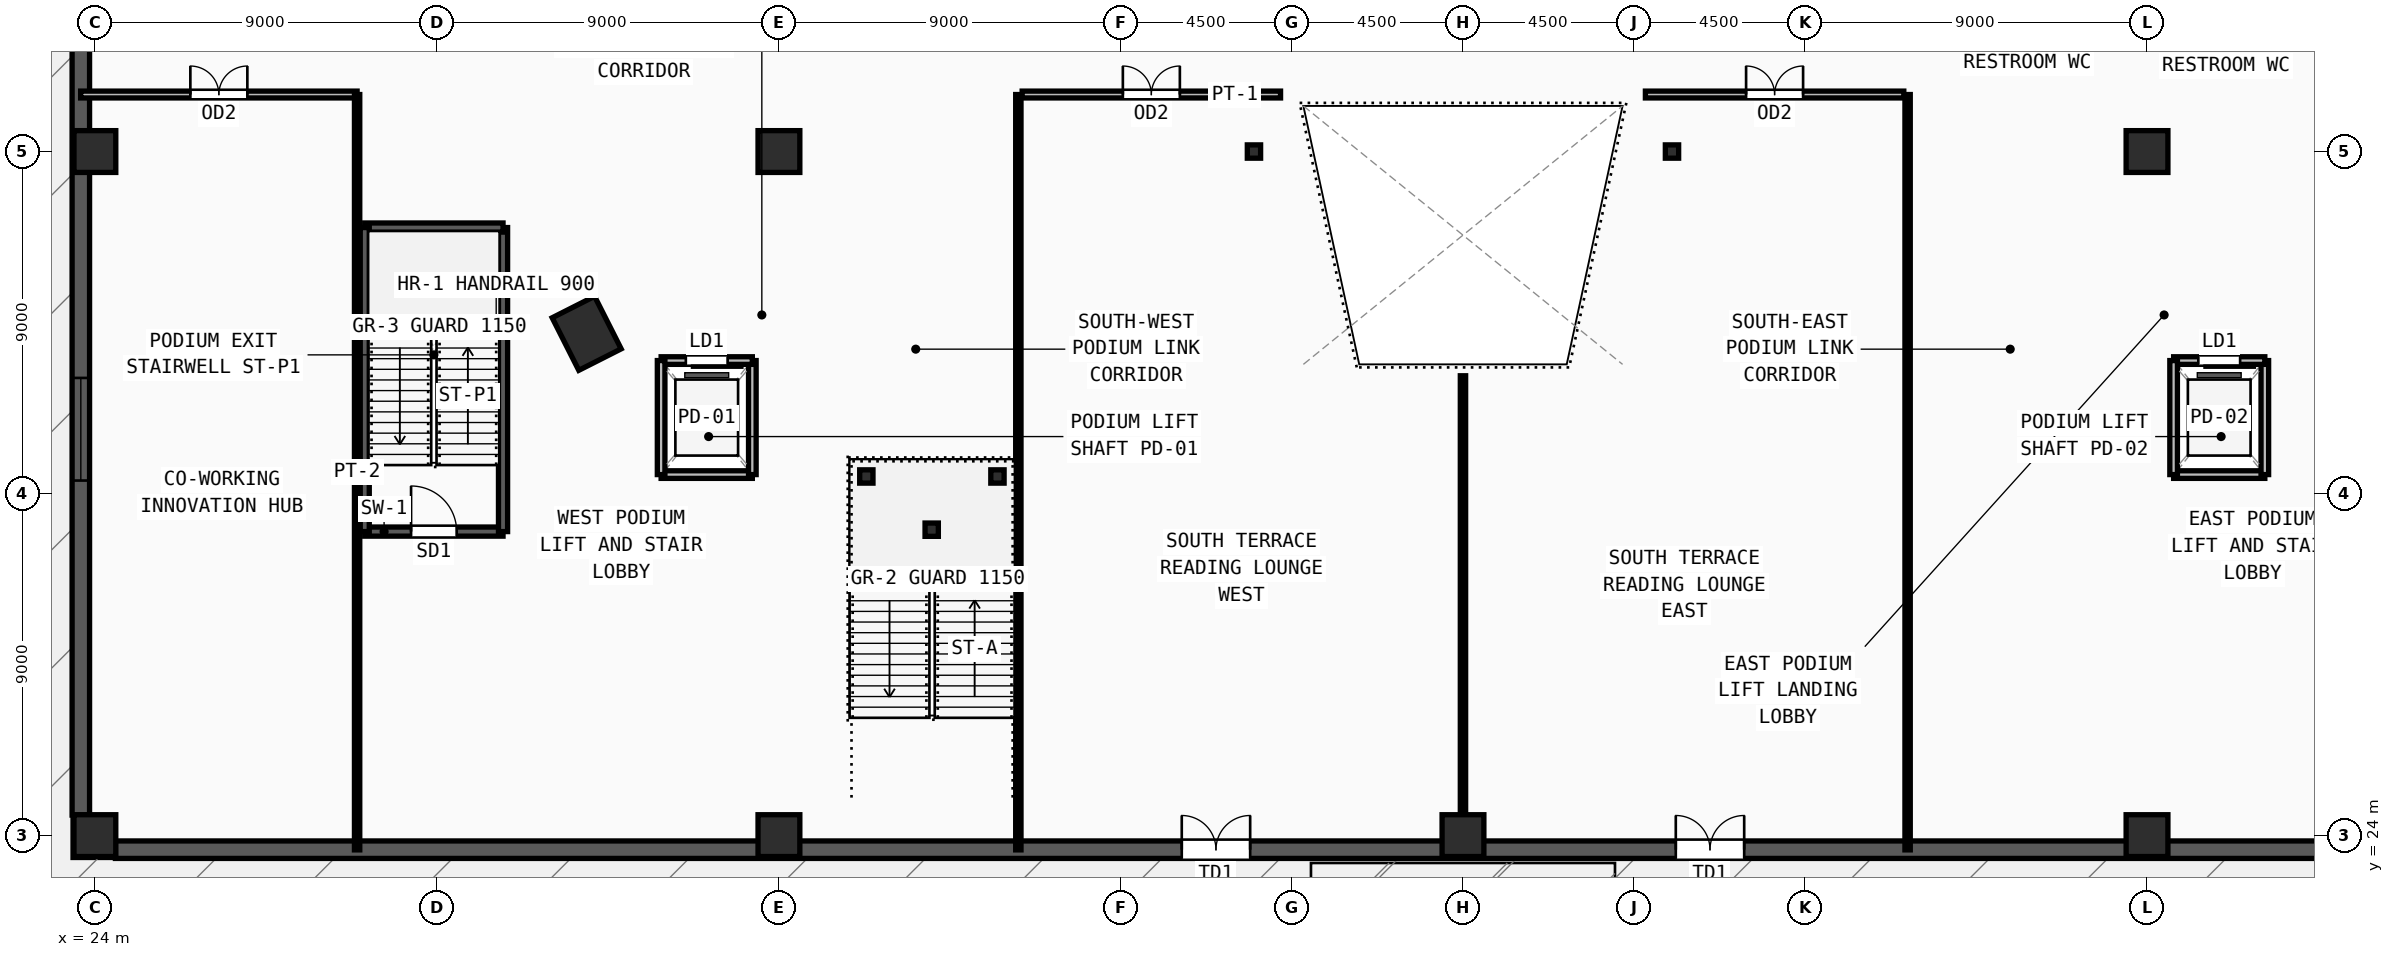
"""IFC4 building model, lengths in metres.
Left out: names, types, materials, properties, quantities, classifications, styles, units other than length and angle.
Written with IfcOpenShell. Run it as: python <this file> out.ifc"""

import sys

from ifc_helpers import new_model, si_unit, direction, frame, frame_2d, origin, origin_2d, place, context, subcontext, project, spatial, rectangle, i_section, extrude, source, transform, mapped, element, fill, save


model = new_model("IFC4")
c1 = context("Model", 3, precision=1e-05, world=origin(), true_north=direction((0.0, 1.0)))
c2 = subcontext(c1, "Body", "Model", "MODEL_VIEW")
j1 = project(units=[si_unit("LENGTHUNIT", "METRE"), si_unit("PLANEANGLEUNIT", "RADIAN")], contexts=[c1])
p1 = place(None, origin())
s1 = spatial("IfcSite", under=j1, at=p1, CompositionType="ELEMENT")
p2 = place(p1, origin())
s2 = spatial("IfcBuilding", under=s1, at=p2, CompositionType="ELEMENT")
p3 = place(p2, frame((0.0, 0.0, 18.9)))
s3 = spatial("IfcBuildingStorey", under=s2, at=p3, CompositionType="ELEMENT", Elevation=18.9)
m1 = source(origin(), c2, "Body", "SweptSolid", [
    extrude(rectangle(XDim=1.55, YDim=1.25, at=origin_2d()), origin(), (0.0, 0.0, 1.0), 4.5),
])
p4 = place(p3, frame((36.941, 37.217, 0.0), z_axis=(0.0, 0.0, 1.0), x_axis=(-0.451500573218, 0.892270829056, 0.0)))
e1 = element("IfcColumn", 1, at=p4, inside=s3, PredefinedType="COLUMN", context=c2, shape_type="MappedRepresentation", body=[
    mapped(m1, transform((0.0, 0.0, 0.0), x_axis=(1.0, 0.0, 0.0), y_axis=(0.0, 1.0, 0.0), z_axis=(0.0, 0.0, 1.0), scale=1.0)),
])
m2 = source(origin(), c2, "Body", "SweptSolid", [
    extrude(rectangle(XDim=1.1, YDim=1.1, at=origin_2d()), origin(), (0.0, 0.0, 1.0), 4.5),
])
for number, where, z_axis, x_axis in (
    (2, (24.0, 24.0, 0.0), (0.0, 0.0, 1.0), (1.0, 0.0, 0.0)),
    (3, (42.0, 24.0, 0.0), (0.0, 0.0, 1.0), (1.0, 0.0, 0.0)),
    (4, (60.0, 24.0, 0.0), (0.0, 0.0, 1.0), (1.0, 0.0, 0.0)),
    (5, (78.0, 24.0, 0.0), (0.0, 0.0, 1.0), (1.0, 0.0, 0.0)),
    (6, (24.0, 42.0, 0.0), (0.0, 0.0, 1.0), (1.0, 0.0, 0.0)),
    (7, (42.0, 42.0, 0.0), (0.0, 0.0, 1.0), (1.0, 0.0, 0.0)),
    (8, (78.0, 42.0, 0.0), (0.0, 0.0, 1.0), (1.0, 0.0, 0.0)),
):
    element("IfcColumn", number, at=place(p3, frame(where, z_axis=z_axis, x_axis=x_axis)), inside=s3, PredefinedType="COLUMN", context=c2, shape_type="MappedRepresentation", body=[
        mapped(m2, transform((0.0, 0.0, 0.0), x_axis=(1.0, 0.0, 0.0), y_axis=(0.0, 1.0, 0.0), z_axis=(0.0, 0.0, 1.0), scale=1.0)),
    ])
m3 = source(origin(), c2, "Body", "SweptSolid", [
    extrude(i_section(OverallWidth=0.35, OverallDepth=0.35, WebThickness=0.012, FlangeThickness=0.019, at=origin_2d()), origin(), (0.0, 0.0, 1.0), 4.5),
])
for number, where, z_axis, x_axis in (
    (9, (54.5, 42.0, 0.0), (0.0, 0.0, 1.0), (1.0, 0.0, 0.0)),
    (10, (65.5, 42.0, 0.0), (0.0, 0.0, 1.0), (1.0, 0.0, 0.0)),
    (11, (44.3, 33.45, 0.0), (0.0, 0.0, 1.0), (1.0, 0.0, 0.0)),
    (12, (47.75, 33.45, 0.0), (0.0, 0.0, 1.0), (1.0, 0.0, 0.0)),
    (13, (46.02, 32.05, 0.0), (0.0, 0.0, 1.0), (1.0, 0.0, 0.0)),
):
    element("IfcColumn", number, at=place(p3, frame(where, z_axis=z_axis, x_axis=x_axis)), inside=s3, PredefinedType="COLUMN", context=c2, shape_type="MappedRepresentation", body=[
        mapped(m3, transform((0.0, 0.0, 0.0), x_axis=(1.0, 0.0, 0.0), y_axis=(0.0, 1.0, 0.0), z_axis=(0.0, 0.0, 1.0), scale=1.0)),
    ])
p5 = place(p3, frame((23.63, 85.46, 0.0), z_axis=(0.0, 0.0, 1.0), x_axis=(0.0, -1.0, 0.0)))
e14 = element("IfcWall", 14, at=p5, inside=s3, PredefinedType="SOLIDWALL", context=c2, shape_type="SweptSolid", body=[
    extrude(rectangle(XDim=60.92, YDim=0.46, at=frame_2d((30.46, 0.0))), origin(), (0.0, 0.0, 1.0), 3.6),
])
m4 = source(origin(), c2, "Body", "SweptSolid", [
    extrude(rectangle(XDim=2.7, YDim=2.35, at=frame_2d((1.35, 1.175))), frame((0.0, 0.24, 0.0), z_axis=(0.0, -1.0, 0.0), x_axis=(1.0, 0.0, 0.0)), (0.0, 0.0, 1.0), 0.48),
])
p6 = place(p5, frame((8.803, 0.0, 0.55)))
e15 = element("IfcOpeningElement", 15, at=p6, cuts=e14, PredefinedType="OPENING", context=c2, shape_type="MappedRepresentation", body=[
    mapped(m4, transform((0.0, 0.0, 0.0), x_axis=(1.0, 0.0, 0.0), y_axis=(0.0, 1.0, 0.0), z_axis=(0.0, 0.0, 1.0), scale=1.0)),
])
p7 = place(p5, frame((18.957, 0.0, 0.55)))
e16 = element("IfcOpeningElement", 16, at=p7, cuts=e14, PredefinedType="OPENING", context=c2, shape_type="MappedRepresentation", body=[
    mapped(m4, transform((0.0, 0.0, 0.0), x_axis=(1.0, 0.0, 0.0), y_axis=(0.0, 1.0, 0.0), z_axis=(0.0, 0.0, 1.0), scale=1.0)),
])
p8 = place(p5, frame((29.11, 0.0, 0.55)))
e17 = element("IfcOpeningElement", 17, at=p8, cuts=e14, PredefinedType="OPENING", context=c2, shape_type="MappedRepresentation", body=[
    mapped(m4, transform((0.0, 0.0, 0.0), x_axis=(1.0, 0.0, 0.0), y_axis=(0.0, 1.0, 0.0), z_axis=(0.0, 0.0, 1.0), scale=1.0)),
])
p9 = place(p5, frame((49.417, 0.0, 0.55)))
e18 = element("IfcOpeningElement", 18, at=p9, cuts=e14, PredefinedType="OPENING", context=c2, shape_type="MappedRepresentation", body=[
    mapped(m4, transform((0.0, 0.0, 0.0), x_axis=(1.0, 0.0, 0.0), y_axis=(0.0, 1.0, 0.0), z_axis=(0.0, 0.0, 1.0), scale=1.0)),
])
p10 = place(p3, frame((24.54, 23.63, 0.0), z_axis=(0.0, 0.0, 1.0), x_axis=(1.0, 0.0, 0.0)))
e19 = element("IfcWall", 19, at=p10, inside=s3, PredefinedType="SOLIDWALL", context=c2, shape_type="SweptSolid", body=[
    extrude(rectangle(XDim=70.92, YDim=0.46, at=frame_2d((35.46, 0.0))), origin(), (0.0, 0.0, 1.0), 3.6),
])
m5 = source(origin(), c2, "Body", "SweptSolid", [
    extrude(rectangle(XDim=1.8, YDim=2.3, at=frame_2d((0.9, 1.15))), frame((0.0, 0.24, 0.0), z_axis=(0.0, -1.0, 0.0), x_axis=(1.0, 0.0, 0.0)), (0.0, 0.0, 1.0), 0.48),
])
p11 = place(p10, frame((28.06, 0.0, 0.0)))
e20 = element("IfcOpeningElement", 20, at=p11, cuts=e19, PredefinedType="OPENING", context=c2, shape_type="MappedRepresentation", body=[
    mapped(m5, transform((0.0, 0.0, 0.0), x_axis=(1.0, 0.0, 0.0), y_axis=(0.0, 1.0, 0.0), z_axis=(0.0, 0.0, 1.0), scale=1.0)),
])
p12 = place(p10, frame((41.06, 0.0, 0.0)))
e21 = element("IfcOpeningElement", 21, at=p12, cuts=e19, PredefinedType="OPENING", context=c2, shape_type="MappedRepresentation", body=[
    mapped(m5, transform((0.0, 0.0, 0.0), x_axis=(1.0, 0.0, 0.0), y_axis=(0.0, 1.0, 0.0), z_axis=(0.0, 0.0, 1.0), scale=1.0)),
])
p13 = place(p3, frame((31.1, 32.0, 0.0), z_axis=(0.0, 0.0, 1.0), x_axis=(1.0, 0.0, 0.0)))
e22 = element("IfcWall", 22, at=p13, inside=s3, PredefinedType="SOLIDWALL", context=c2, shape_type="SweptSolid", body=[
    extrude(rectangle(XDim=3.64, YDim=0.24, at=frame_2d((1.82, 0.0))), origin(), (0.0, 0.0, 1.0), 3.6),
])
m6 = source(origin(), c2, "Body", "SweptSolid", [
    extrude(rectangle(XDim=1.2, YDim=2.2, at=frame_2d((0.6, 1.1))), frame((0.0, 0.13, 0.0), z_axis=(0.0, -1.0, 0.0), x_axis=(1.0, 0.0, 0.0)), (0.0, 0.0, 1.0), 0.26),
])
p14 = place(p13, frame((1.22, 0.0, 0.0)))
e23 = element("IfcOpeningElement", 23, at=p14, cuts=e22, PredefinedType="OPENING", context=c2, shape_type="MappedRepresentation", body=[
    mapped(m6, transform((0.0, 0.0, 0.0), x_axis=(1.0, 0.0, 0.0), y_axis=(0.0, 1.0, 0.0), z_axis=(0.0, 0.0, 1.0), scale=1.0)),
])
p15 = place(p3, frame((34.74, 32.0, 0.0), z_axis=(0.0, 0.0, 1.0), x_axis=(0.0, 1.0, 0.0)))
e24 = element("IfcWall", 24, at=p15, inside=s3, PredefinedType="SOLIDWALL", context=c2, shape_type="SweptSolid", body=[
    extrude(rectangle(XDim=8.0, YDim=0.24, at=frame_2d((4.0, 0.0))), origin(), (0.0, 0.0, 1.0), 3.6),
])
p16 = place(p3, frame((34.74, 40.0, 0.0), z_axis=(0.0, 0.0, 1.0), x_axis=(-1.0, 0.0, 0.0)))
e25 = element("IfcWall", 25, at=p16, inside=s3, PredefinedType="SOLIDWALL", context=c2, shape_type="SweptSolid", body=[
    extrude(rectangle(XDim=3.64, YDim=0.24, at=frame_2d((1.82, 0.0))), origin(), (0.0, 0.0, 1.0), 3.6),
])
p17 = place(p3, frame((31.1, 40.0, 0.0), z_axis=(0.0, 0.0, 1.0), x_axis=(0.0, -1.0, 0.0)))
e26 = element("IfcWall", 26, at=p17, inside=s3, PredefinedType="SOLIDWALL", context=c2, shape_type="SweptSolid", body=[
    extrude(rectangle(XDim=8.0, YDim=0.24, at=frame_2d((4.0, 0.0))), origin(), (0.0, 0.0, 1.0), 3.6),
])
p18 = place(p3, frame((38.9, 33.5, 0.0), z_axis=(0.0, 0.0, 1.0), x_axis=(1.0, 0.0, 0.0)))
e27 = element("IfcWall", 27, at=p18, inside=s3, PredefinedType="SOLIDWALL", context=c2, shape_type="SweptSolid", body=[
    extrude(rectangle(XDim=2.4, YDim=0.2, at=frame_2d((1.2, 0.0))), origin(), (0.0, 0.0, 1.0), 3.6),
])
p19 = place(p3, frame((41.3, 33.5, 0.0), z_axis=(0.0, 0.0, 1.0), x_axis=(0.0, 1.0, 0.0)))
e28 = element("IfcWall", 28, at=p19, inside=s3, PredefinedType="SOLIDWALL", context=c2, shape_type="SweptSolid", body=[
    extrude(rectangle(XDim=3.0, YDim=0.2, at=frame_2d((1.5, 0.0))), origin(), (0.0, 0.0, 1.0), 3.6),
])
p20 = place(p3, frame((41.3, 36.5, 0.0), z_axis=(0.0, 0.0, 1.0), x_axis=(-1.0, 0.0, 0.0)))
e29 = element("IfcWall", 29, at=p20, inside=s3, PredefinedType="SOLIDWALL", context=c2, shape_type="SweptSolid", body=[
    extrude(rectangle(XDim=2.4, YDim=0.2, at=frame_2d((1.2, 0.0))), origin(), (0.0, 0.0, 1.0), 3.6),
])
m7 = source(origin(), c2, "Body", "SweptSolid", [
    extrude(rectangle(XDim=1.1, YDim=2.2, at=frame_2d((0.55, 1.1))), frame((0.0, 0.11, 0.0), z_axis=(0.0, -1.0, 0.0), x_axis=(1.0, 0.0, 0.0)), (0.0, 0.0, 1.0), 0.22),
])
p21 = place(p20, frame((0.65, 0.0, 0.0)))
e30 = element("IfcOpeningElement", 30, at=p21, cuts=e29, PredefinedType="OPENING", context=c2, shape_type="MappedRepresentation", body=[
    mapped(m7, transform((0.0, 0.0, 0.0), x_axis=(1.0, 0.0, 0.0), y_axis=(0.0, 1.0, 0.0), z_axis=(0.0, 0.0, 1.0), scale=1.0)),
])
p22 = place(p3, frame((38.9, 36.5, 0.0), z_axis=(0.0, 0.0, 1.0), x_axis=(0.0, -1.0, 0.0)))
e31 = element("IfcWall", 31, at=p22, inside=s3, PredefinedType="SOLIDWALL", context=c2, shape_type="SweptSolid", body=[
    extrude(rectangle(XDim=3.0, YDim=0.2, at=frame_2d((1.5, 0.0))), origin(), (0.0, 0.0, 1.0), 3.6),
])
p23 = place(p3, frame((78.7, 33.5, 0.0), z_axis=(0.0, 0.0, 1.0), x_axis=(1.0, 0.0, 0.0)))
e32 = element("IfcWall", 32, at=p23, inside=s3, PredefinedType="SOLIDWALL", context=c2, shape_type="SweptSolid", body=[
    extrude(rectangle(XDim=2.4, YDim=0.2, at=frame_2d((1.2, 0.0))), origin(), (0.0, 0.0, 1.0), 3.6),
])
p24 = place(p3, frame((81.1, 33.5, 0.0), z_axis=(0.0, 0.0, 1.0), x_axis=(0.0, 1.0, 0.0)))
e33 = element("IfcWall", 33, at=p24, inside=s3, PredefinedType="SOLIDWALL", context=c2, shape_type="SweptSolid", body=[
    extrude(rectangle(XDim=3.0, YDim=0.2, at=frame_2d((1.5, 0.0))), origin(), (0.0, 0.0, 1.0), 3.6),
])
p25 = place(p3, frame((81.1, 36.5, 0.0), z_axis=(0.0, 0.0, 1.0), x_axis=(-1.0, 0.0, 0.0)))
e34 = element("IfcWall", 34, at=p25, inside=s3, PredefinedType="SOLIDWALL", context=c2, shape_type="SweptSolid", body=[
    extrude(rectangle(XDim=2.4, YDim=0.2, at=frame_2d((1.2, 0.0))), origin(), (0.0, 0.0, 1.0), 3.6),
])
p26 = place(p25, frame((0.65, 0.0, 0.0)))
e35 = element("IfcOpeningElement", 35, at=p26, cuts=e34, PredefinedType="OPENING", context=c2, shape_type="MappedRepresentation", body=[
    mapped(m7, transform((0.0, 0.0, 0.0), x_axis=(1.0, 0.0, 0.0), y_axis=(0.0, 1.0, 0.0), z_axis=(0.0, 0.0, 1.0), scale=1.0)),
])
p27 = place(p3, frame((78.7, 36.5, 0.0), z_axis=(0.0, 0.0, 1.0), x_axis=(0.0, -1.0, 0.0)))
e36 = element("IfcWall", 36, at=p27, inside=s3, PredefinedType="SOLIDWALL", context=c2, shape_type="SweptSolid", body=[
    extrude(rectangle(XDim=3.0, YDim=0.2, at=frame_2d((1.5, 0.0))), origin(), (0.0, 0.0, 1.0), 3.6),
])
p28 = place(p3, frame((48.4, 43.5, 0.0), z_axis=(0.0, 0.0, 1.0), x_axis=(1.0, 0.0, 0.0)))
e37 = element("IfcWall", 37, at=p28, inside=s3, PredefinedType="PARTITIONING", context=c2, shape_type="SweptSolid", body=[
    extrude(rectangle(XDim=6.8, YDim=0.18, at=frame_2d((3.4, 0.0))), origin(), (0.0, 0.0, 1.0), 3.6),
])
m8 = source(origin(), c2, "Body", "SweptSolid", [
    extrude(rectangle(XDim=1.5, YDim=2.2, at=frame_2d((0.75, 1.1))), frame((0.0, 0.1, 0.0), z_axis=(0.0, -1.0, 0.0), x_axis=(1.0, 0.0, 0.0)), (0.0, 0.0, 1.0), 0.2),
])
p29 = place(p28, frame((2.65, 0.0, 0.0)))
e38 = element("IfcOpeningElement", 38, at=p29, cuts=e37, PredefinedType="OPENING", context=c2, shape_type="MappedRepresentation", body=[
    mapped(m8, transform((0.0, 0.0, 0.0), x_axis=(1.0, 0.0, 0.0), y_axis=(0.0, 1.0, 0.0), z_axis=(0.0, 0.0, 1.0), scale=1.0)),
])
p30 = place(p3, frame((64.8, 43.5, 0.0), z_axis=(0.0, 0.0, 1.0), x_axis=(1.0, 0.0, 0.0)))
e39 = element("IfcWall", 39, at=p30, inside=s3, PredefinedType="PARTITIONING", context=c2, shape_type="SweptSolid", body=[
    extrude(rectangle(XDim=6.8, YDim=0.18, at=frame_2d((3.4, 0.0))), origin(), (0.0, 0.0, 1.0), 3.6),
])
p31 = place(p30, frame((2.65, 0.0, 0.0)))
e40 = element("IfcOpeningElement", 40, at=p31, cuts=e39, PredefinedType="OPENING", context=c2, shape_type="MappedRepresentation", body=[
    mapped(m8, transform((0.0, 0.0, 0.0), x_axis=(1.0, 0.0, 0.0), y_axis=(0.0, 1.0, 0.0), z_axis=(0.0, 0.0, 1.0), scale=1.0)),
])
p32 = place(p3, frame((23.625, 43.5, 0.0), z_axis=(0.0, 0.0, 1.0), x_axis=(1.0, 0.0, 0.0)))
e41 = element("IfcWall", 41, at=p32, inside=s3, PredefinedType="PARTITIONING", context=c2, shape_type="SweptSolid", body=[
    extrude(rectangle(XDim=7.275, YDim=0.18, at=frame_2d((3.637, 0.0))), origin(), (0.0, 0.0, 1.0), 3.6),
])
p33 = place(p32, frame((2.887, 0.0, 0.0)))
e42 = element("IfcOpeningElement", 42, at=p33, cuts=e41, PredefinedType="OPENING", context=c2, shape_type="MappedRepresentation", body=[
    mapped(m8, transform((0.0, 0.0, 0.0), x_axis=(1.0, 0.0, 0.0), y_axis=(0.0, 1.0, 0.0), z_axis=(0.0, 0.0, 1.0), scale=1.0)),
])
for number, where, z_axis, x_axis in (
    (43, (30.9, 23.625, 0.0), (0.0, 0.0, 1.0), (0.0, 1.0, 0.0)),
    (44, (48.3, 23.625, 0.0), (0.0, 0.0, 1.0), (0.0, 1.0, 0.0)),
    (45, (71.7, 23.625, 0.0), (0.0, 0.0, 1.0), (0.0, 1.0, 0.0)),
):
    element("IfcWall", number, at=place(p3, frame(where, z_axis=z_axis, x_axis=x_axis)), inside=s3, PredefinedType="PARTITIONING", context=c2, shape_type="SweptSolid", body=[
        extrude(rectangle(XDim=19.875, YDim=0.14, at=frame_2d((9.938, 0.0))), origin(), (0.0, 0.0, 1.0), 3.6),
    ])
p34 = place(p3, frame((60.0, 23.625, 0.0), z_axis=(0.0, 0.0, 1.0), x_axis=(0.0, 1.0, 0.0)))
e46 = element("IfcWall", 46, at=p34, inside=s3, PredefinedType="PARTITIONING", context=c2, shape_type="SweptSolid", body=[
    extrude(rectangle(XDim=12.475, YDim=0.14, at=frame_2d((6.238, 0.0))), origin(), (0.0, 0.0, 1.0), 3.6),
])
m9 = source(origin(), c2, "Body", "SweptSolid", [
    extrude(rectangle(XDim=2.7, YDim=2.35, at=frame_2d((1.35, 1.175))), frame((0.0, 0.03, 0.0), z_axis=(0.0, -1.0, 0.0), x_axis=(1.0, 0.0, 0.0)), (0.0, 0.0, 1.0), 0.06),
])
p35 = place(p9, origin())
e47 = element("IfcWindow", 47, at=p35, inside=s3, PartitioningType="TRIPLE_PANEL_VERTICAL", PredefinedType="WINDOW", context=c2, shape_type="MappedRepresentation", body=[
    mapped(m9, transform((0.0, 0.0, 0.0), x_axis=(1.0, 0.0, 0.0), y_axis=(0.0, 1.0, 0.0), z_axis=(0.0, 0.0, 1.0), scale=1.0)),
])
fill(e18, e47)
m10 = source(origin(), c2, "Body", "SweptSolid", [
    extrude(rectangle(XDim=1.8, YDim=2.3, at=frame_2d((0.9, 1.15))), frame((0.0, 0.025, 0.0), z_axis=(0.0, -1.0, 0.0), x_axis=(1.0, 0.0, 0.0)), (0.0, 0.0, 1.0), 0.05),
])
p36 = place(p11, origin())
e48 = element("IfcDoor", 48, at=p36, inside=s3, OperationType="DOUBLE_DOOR_SINGLE_SWING", PredefinedType="DOOR", context=c2, shape_type="MappedRepresentation", body=[
    mapped(m10, transform((0.0, 0.0, 0.0), x_axis=(1.0, 0.0, 0.0), y_axis=(0.0, 1.0, 0.0), z_axis=(0.0, 0.0, 1.0), scale=1.0)),
])
fill(e20, e48)
p37 = place(p12, origin())
e49 = element("IfcDoor", 49, at=p37, inside=s3, OperationType="DOUBLE_DOOR_SINGLE_SWING", PredefinedType="DOOR", context=c2, shape_type="MappedRepresentation", body=[
    mapped(m10, transform((0.0, 0.0, 0.0), x_axis=(1.0, 0.0, 0.0), y_axis=(0.0, 1.0, 0.0), z_axis=(0.0, 0.0, 1.0), scale=1.0)),
])
fill(e21, e49)
m11 = source(origin(), c2, "Body", "SweptSolid", [
    extrude(rectangle(XDim=1.2, YDim=2.2, at=frame_2d((0.6, 1.1))), frame((0.0, 0.025, 0.0), z_axis=(0.0, -1.0, 0.0), x_axis=(1.0, 0.0, 0.0)), (0.0, 0.0, 1.0), 0.05),
])
p38 = place(p14, origin())
e50 = element("IfcDoor", 50, at=p38, inside=s3, OperationType="SINGLE_SWING_LEFT", PredefinedType="DOOR", context=c2, shape_type="MappedRepresentation", body=[
    mapped(m11, transform((0.0, 0.0, 0.0), x_axis=(1.0, 0.0, 0.0), y_axis=(0.0, 1.0, 0.0), z_axis=(0.0, 0.0, 1.0), scale=1.0)),
])
fill(e23, e50)
m12 = source(origin(), c2, "Body", "SweptSolid", [
    extrude(rectangle(XDim=1.1, YDim=2.2, at=frame_2d((0.55, 1.1))), frame((0.0, 0.025, 0.0), z_axis=(0.0, -1.0, 0.0), x_axis=(1.0, 0.0, 0.0)), (0.0, 0.0, 1.0), 0.05),
])
p39 = place(p21, origin())
e51 = element("IfcDoor", 51, at=p39, inside=s3, OperationType="SLIDING_TO_LEFT", PredefinedType="DOOR", context=c2, shape_type="MappedRepresentation", body=[
    mapped(m12, transform((0.0, 0.0, 0.0), x_axis=(1.0, 0.0, 0.0), y_axis=(0.0, 1.0, 0.0), z_axis=(0.0, 0.0, 1.0), scale=1.0)),
])
fill(e30, e51)
p40 = place(p26, origin())
e52 = element("IfcDoor", 52, at=p40, inside=s3, OperationType="SLIDING_TO_LEFT", PredefinedType="DOOR", context=c2, shape_type="MappedRepresentation", body=[
    mapped(m12, transform((0.0, 0.0, 0.0), x_axis=(1.0, 0.0, 0.0), y_axis=(0.0, 1.0, 0.0), z_axis=(0.0, 0.0, 1.0), scale=1.0)),
])
fill(e35, e52)
m13 = source(origin(), c2, "Body", "SweptSolid", [
    extrude(rectangle(XDim=1.5, YDim=2.2, at=frame_2d((0.75, 1.1))), frame((0.0, 0.025, 0.0), z_axis=(0.0, -1.0, 0.0), x_axis=(1.0, 0.0, 0.0)), (0.0, 0.0, 1.0), 0.05),
])
p41 = place(p29, origin())
e53 = element("IfcDoor", 53, at=p41, inside=s3, OperationType="DOUBLE_DOOR_SINGLE_SWING", PredefinedType="DOOR", context=c2, shape_type="MappedRepresentation", body=[
    mapped(m13, transform((0.0, 0.0, 0.0), x_axis=(1.0, 0.0, 0.0), y_axis=(0.0, 1.0, 0.0), z_axis=(0.0, 0.0, 1.0), scale=1.0)),
])
fill(e38, e53)
p42 = place(p31, origin())
e54 = element("IfcDoor", 54, at=p42, inside=s3, OperationType="DOUBLE_DOOR_SINGLE_SWING", PredefinedType="DOOR", context=c2, shape_type="MappedRepresentation", body=[
    mapped(m13, transform((0.0, 0.0, 0.0), x_axis=(1.0, 0.0, 0.0), y_axis=(0.0, 1.0, 0.0), z_axis=(0.0, 0.0, 1.0), scale=1.0)),
])
fill(e40, e54)
p43 = place(p33, origin())
e55 = element("IfcDoor", 55, at=p43, inside=s3, OperationType="DOUBLE_DOOR_SINGLE_SWING", PredefinedType="DOOR", context=c2, shape_type="MappedRepresentation", body=[
    mapped(m13, transform((0.0, 0.0, 0.0), x_axis=(1.0, 0.0, 0.0), y_axis=(0.0, 1.0, 0.0), z_axis=(0.0, 0.0, 1.0), scale=1.0)),
])
fill(e42, e55)
save(model, sys.argv[1])
